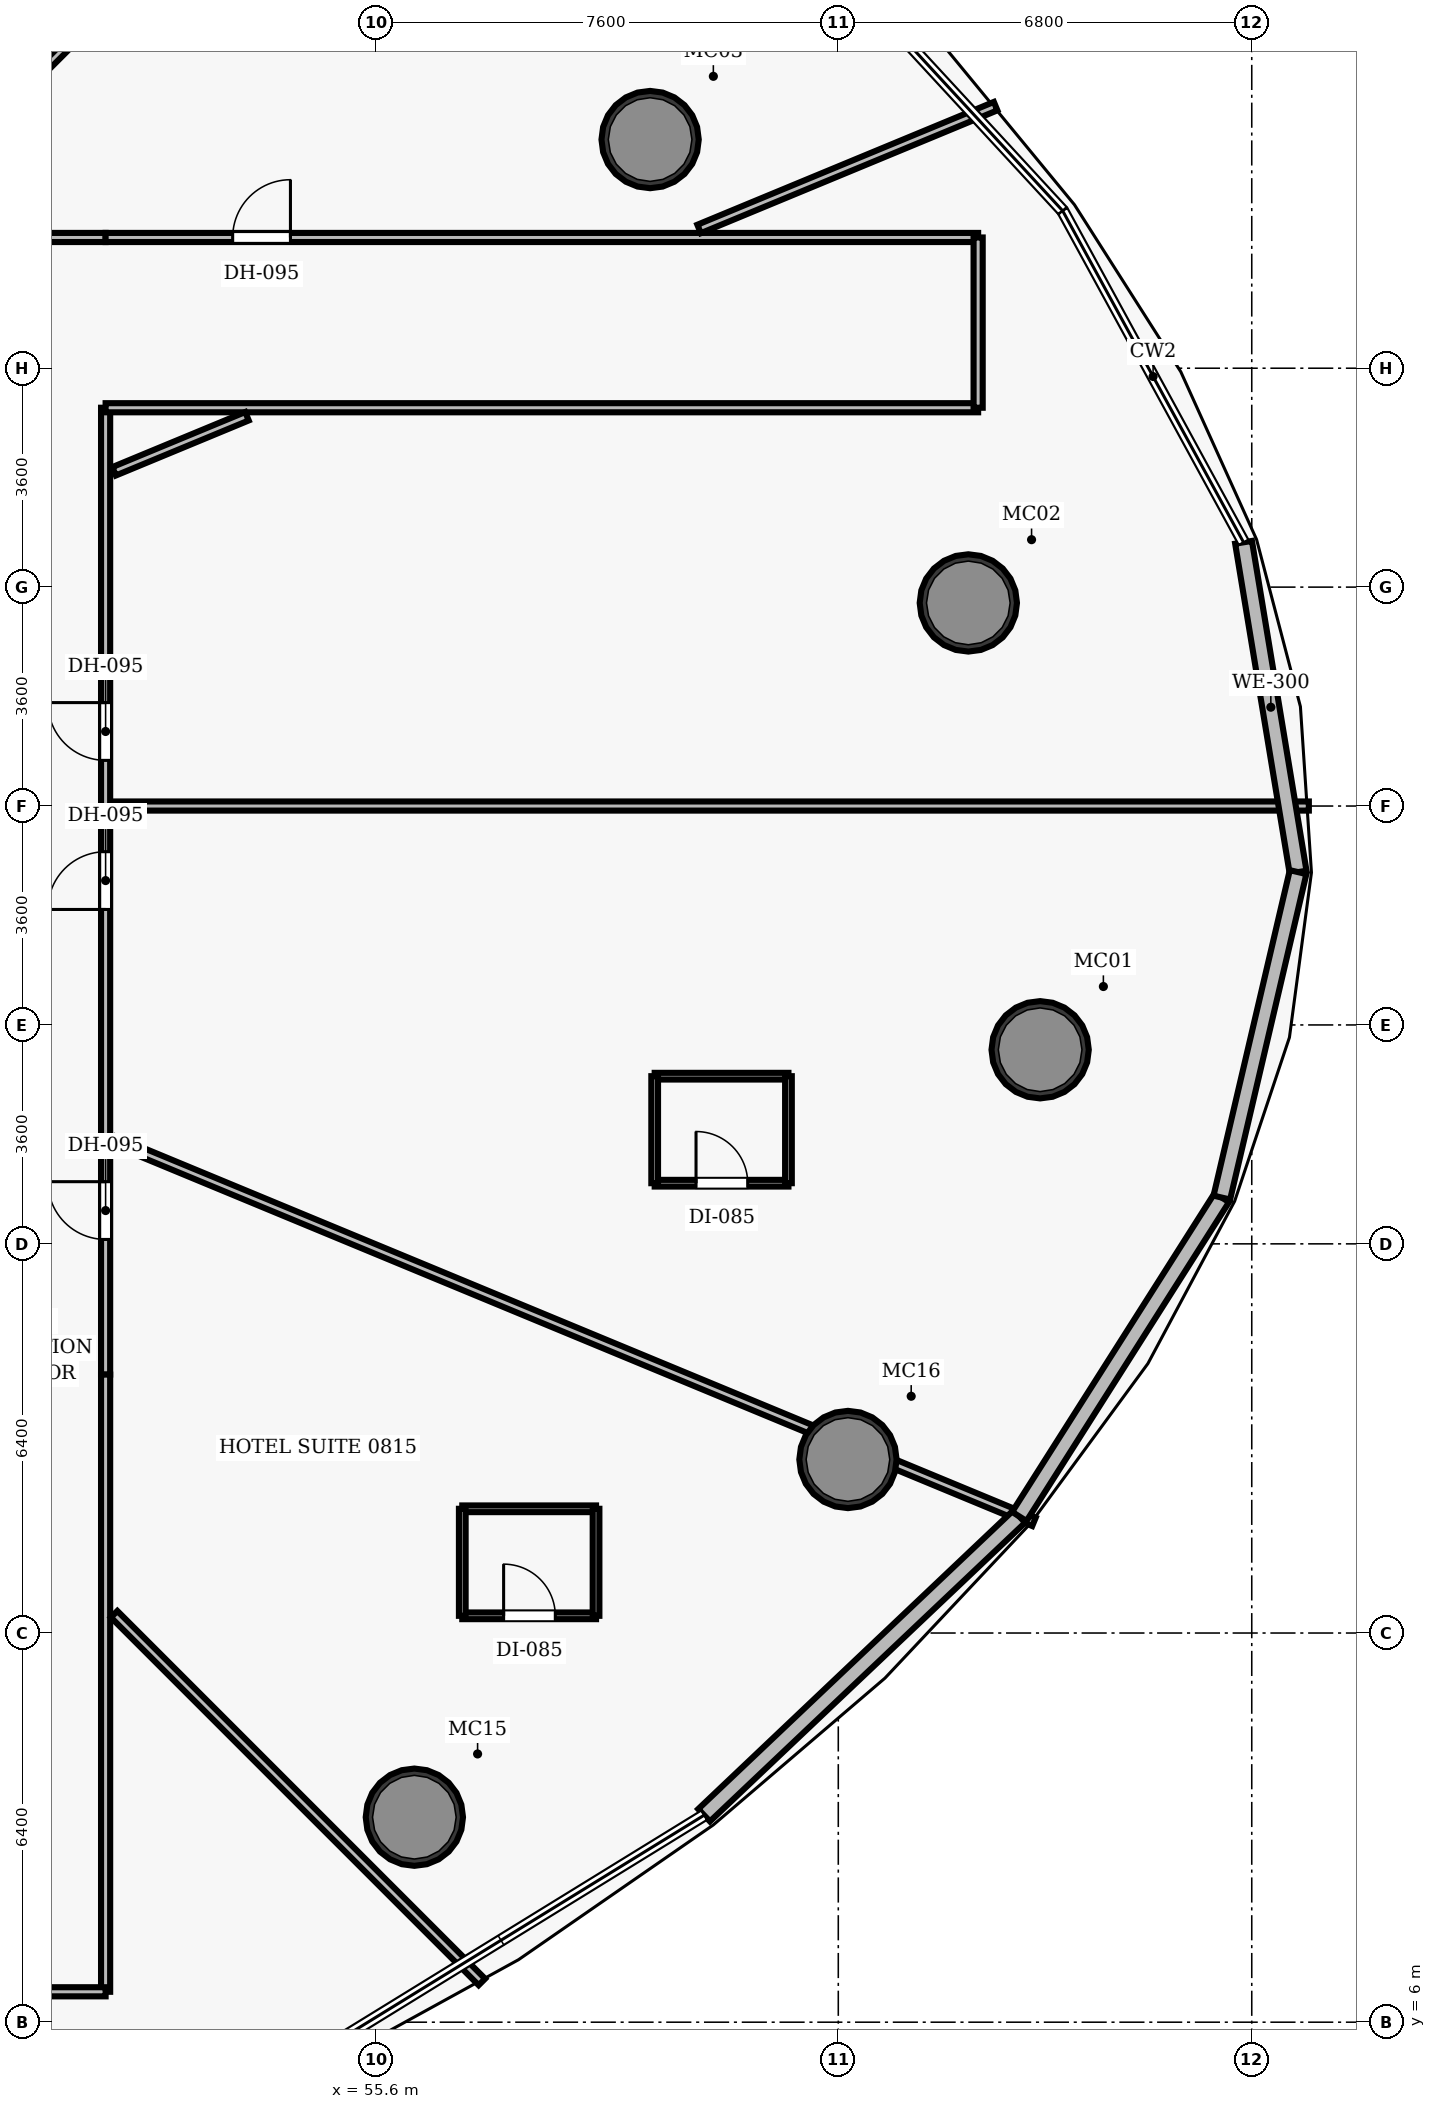
"""IFC4 building model, lengths in metres.
Left out: names, types, materials, properties, quantities, classifications, styles, units other than length and angle.
Written with IfcOpenShell. Run it as: python <this file> out.ifc"""

import sys

from ifc_helpers import new_model, si_unit, direction, frame, frame_2d, origin, origin_2d, place, context, subcontext, project, spatial, rectangle, hollow_circle, extrude, element, fill, save


model = new_model("IFC4")
c1 = context("Model", 3, precision=1e-05, world=origin(), true_north=direction((0.0, 1.0)))
c2 = subcontext(c1, "Body", "Model", "MODEL_VIEW")
j1 = project(units=[si_unit("LENGTHUNIT", "METRE"), si_unit("PLANEANGLEUNIT", "RADIAN")], contexts=[c1])
p1 = place(None, origin())
s1 = spatial("IfcSite", under=j1, at=p1, CompositionType="ELEMENT")
p2 = place(p1, origin())
s2 = spatial("IfcBuilding", under=s1, at=p2, CompositionType="ELEMENT")
p3 = place(p2, frame((0.0, 0.0, 44.9)))
s3 = spatial("IfcBuildingStorey", under=s2, at=p3, CompositionType="ELEMENT", Elevation=44.9)
for number, where, z_axis, x_axis in (
    (1, (66.52, 21.992, 0.0), (0.0, 0.0, 1.0), (1.0, 0.0, 0.0)),
    (2, (65.339, 29.34, 0.0), (0.0, 0.0, 1.0), (1.0, 0.0, 0.0)),
    (3, (60.105, 36.96, 0.0), (0.0, 0.0, 1.0), (1.0, 0.0, 0.0)),
    (4, (56.228, 9.371, 0.0), (0.0, 0.0, 1.0), (1.0, 0.0, 0.0)),
    (5, (63.359, 15.254, 0.0), (0.0, 0.0, 1.0), (1.0, 0.0, 0.0)),
):
    element("IfcColumn", number, at=place(p3, frame(where, z_axis=z_axis, x_axis=x_axis)), inside=s3, PredefinedType="COLUMN", context=c2, shape_type="SweptSolid", body=[
        extrude(hollow_circle(Radius=0.8, WallThickness=0.06, at=origin_2d()), origin(), (0.0, 0.0, 1.0), 3.5),
    ])
p4 = place(p3, frame((27.65, 35.35, 0.0), z_axis=(0.0, 0.0, 1.0), x_axis=(1.0, 0.0, 0.0)))
e6 = element("IfcWall", 6, at=p4, inside=s3, PredefinedType="PARTITIONING", context=c2, shape_type="SweptSolid", body=[
    extrude(rectangle(XDim=23.5, YDim=0.15, at=frame_2d((11.75, 0.0))), origin(), (0.0, 0.0, 1.0), 2.6),
])
p5 = place(p4, frame((15.045, 0.0, 0.0)))
e7 = element("IfcOpeningElement", 7, at=p5, cuts=e6, PredefinedType="OPENING", context=c2, shape_type="SweptSolid", body=[
    extrude(rectangle(XDim=0.95, YDim=2.15, at=frame_2d((0.475, 1.075))), frame((0.0, 0.085, 0.0), z_axis=(0.0, -1.0, 0.0), x_axis=(1.0, 0.0, 0.0)), (0.0, 0.0, 1.0), 0.17),
])
p6 = place(p4, frame((11.159, 0.0, 0.0)))
e8 = element("IfcOpeningElement", 8, at=p6, cuts=e6, PredefinedType="OPENING", context=c2, shape_type="SweptSolid", body=[
    extrude(rectangle(XDim=0.95, YDim=2.15, at=frame_2d((0.475, 1.075))), frame((0.0, 0.085, 0.0), z_axis=(0.0, -1.0, 0.0), x_axis=(1.0, 0.0, 0.0)), (0.0, 0.0, 1.0), 0.17),
])
p7 = place(p4, frame((7.914, 0.0, 0.0)))
e9 = element("IfcOpeningElement", 9, at=p7, cuts=e6, PredefinedType="OPENING", context=c2, shape_type="SweptSolid", body=[
    extrude(rectangle(XDim=0.95, YDim=2.15, at=frame_2d((0.475, 1.075))), frame((0.0, 0.085, 0.0), z_axis=(0.0, -1.0, 0.0), x_axis=(1.0, 0.0, 0.0)), (0.0, 0.0, 1.0), 0.17),
])
p8 = place(p4, frame((4.705, 0.0, 0.0)))
e10 = element("IfcOpeningElement", 10, at=p8, cuts=e6, PredefinedType="OPENING", context=c2, shape_type="SweptSolid", body=[
    extrude(rectangle(XDim=0.95, YDim=2.15, at=frame_2d((0.475, 1.075))), frame((0.0, 0.085, 0.0), z_axis=(0.0, -1.0, 0.0), x_axis=(1.0, 0.0, 0.0)), (0.0, 0.0, 1.0), 0.17),
])
p9 = place(p3, frame((51.15, 16.65, 0.0), z_axis=(0.0, 0.0, 1.0), x_axis=(0.0, 1.0, 0.0)))
e11 = element("IfcWall", 11, at=p9, inside=s3, PredefinedType="PARTITIONING", context=c2, shape_type="SweptSolid", body=[
    extrude(rectangle(XDim=15.9, YDim=0.15, at=frame_2d((7.95, 0.0))), origin(), (0.0, 0.0, 1.0), 2.6),
])
p10 = place(p9, frame((10.101, 0.0, 0.0)))
e12 = element("IfcOpeningElement", 12, at=p10, cuts=e11, PredefinedType="OPENING", context=c2, shape_type="SweptSolid", body=[
    extrude(rectangle(XDim=0.95, YDim=2.15, at=frame_2d((0.475, 1.075))), frame((0.0, 0.085, 0.0), z_axis=(0.0, -1.0, 0.0), x_axis=(1.0, 0.0, 0.0)), (0.0, 0.0, 1.0), 0.17),
])
p11 = place(p9, frame((2.222, 0.0, 0.0)))
e13 = element("IfcOpeningElement", 13, at=p11, cuts=e11, PredefinedType="OPENING", context=c2, shape_type="SweptSolid", body=[
    extrude(rectangle(XDim=0.95, YDim=2.15, at=frame_2d((0.475, 1.075))), frame((0.0, 0.085, 0.0), z_axis=(0.0, -1.0, 0.0), x_axis=(1.0, 0.0, 0.0)), (0.0, 0.0, 1.0), 0.17),
])
p12 = place(p9, frame((7.649, 0.0, 0.0)))
e14 = element("IfcOpeningElement", 14, at=p12, cuts=e11, PredefinedType="OPENING", context=c2, shape_type="SweptSolid", body=[
    extrude(rectangle(XDim=0.95, YDim=2.15, at=frame_2d((0.475, 1.075))), frame((0.0, 0.085, 0.0), z_axis=(0.0, -1.0, 0.0), x_axis=(1.0, 0.0, 0.0)), (0.0, 0.0, 1.0), 0.17),
])
p13 = place(p3, frame((51.15, 35.35, 0.0), z_axis=(0.0, 0.0, 1.0), x_axis=(1.0, 0.0, 0.0)))
e15 = element("IfcWall", 15, at=p13, inside=s3, PredefinedType="PARTITIONING", context=c2, shape_type="SweptSolid", body=[
    extrude(rectangle(XDim=14.35, YDim=0.15, at=frame_2d((7.175, 0.0))), origin(), (0.0, 0.0, 1.0), 2.6),
])
p14 = place(p13, frame((2.09, 0.0, 0.0)))
e16 = element("IfcOpeningElement", 16, at=p14, cuts=e15, PredefinedType="OPENING", context=c2, shape_type="SweptSolid", body=[
    extrude(rectangle(XDim=0.95, YDim=2.15, at=frame_2d((0.475, 1.075))), frame((0.0, 0.085, 0.0), z_axis=(0.0, -1.0, 0.0), x_axis=(1.0, 0.0, 0.0)), (0.0, 0.0, 1.0), 0.17),
])
p15 = place(p3, frame((51.15, 32.55, 0.0), z_axis=(0.0, 0.0, 1.0), x_axis=(1.0, 0.0, 0.0)))
e17 = element("IfcWall", 17, at=p15, inside=s3, PredefinedType="PARTITIONING", context=c2, shape_type="SweptSolid", body=[
    extrude(rectangle(XDim=14.35, YDim=0.15, at=frame_2d((7.175, 0.0))), origin(), (0.0, 0.0, 1.0), 2.6),
])
p16 = place(p3, frame((65.5, 32.55, 0.0), z_axis=(0.0, 0.0, 1.0), x_axis=(0.0, 1.0, 0.0)))
e18 = element("IfcWall", 18, at=p16, inside=s3, PredefinedType="PARTITIONING", context=c2, shape_type="SweptSolid", body=[
    extrude(rectangle(XDim=2.8, YDim=0.15, at=frame_2d((1.4, 0.0))), origin(), (0.0, 0.0, 1.0), 2.6),
])
p17 = place(p3, frame((51.15, 6.5, 0.0), z_axis=(0.0, 0.0, 1.0), x_axis=(0.0, 1.0, 0.0)))
e19 = element("IfcWall", 19, at=p17, inside=s3, PredefinedType="PARTITIONING", context=c2, shape_type="SweptSolid", body=[
    extrude(rectangle(XDim=10.15, YDim=0.15, at=frame_2d((5.075, 0.0))), origin(), (0.0, 0.0, 1.0), 2.6),
])
p18 = place(p3, frame((48.35, 6.5, 0.0), z_axis=(0.0, 0.0, 1.0), x_axis=(1.0, 0.0, 0.0)))
e20 = element("IfcWall", 20, at=p18, inside=s3, PredefinedType="PARTITIONING", context=c2, shape_type="SweptSolid", body=[
    extrude(rectangle(XDim=2.8, YDim=0.15, at=frame_2d((1.4, 0.0))), origin(), (0.0, 0.0, 1.0), 2.6),
])
p19 = place(p3, frame((51.29, 26.0, 0.0), z_axis=(0.0, 0.0, 1.0), x_axis=(1.0, 0.0, 0.0)))
e21 = element("IfcWall", 21, at=p19, inside=s3, PredefinedType="PARTITIONING", context=c2, shape_type="SweptSolid", body=[
    extrude(rectangle(XDim=19.649, YDim=0.15, at=frame_2d((9.824, 0.0))), origin(), (0.0, 0.0, 1.0), 2.6),
])
p20 = place(p3, frame((51.29, 31.505, 0.0), z_axis=(0.0, 0.0, 1.0), x_axis=(0.923887247067, 0.382664807249, 0.0)))
e22 = element("IfcWall", 22, at=p20, inside=s3, PredefinedType="PARTITIONING", context=c2, shape_type="SweptSolid", body=[
    extrude(rectangle(XDim=2.365, YDim=0.15, at=frame_2d((1.183, 0.0))), origin(), (0.0, 0.0, 1.0), 2.6),
])
p21 = place(p3, frame((60.911, 35.49, 0.0), z_axis=(0.0, 0.0, 1.0), x_axis=(0.923878157401, 0.382686752157, 0.0)))
e23 = element("IfcWall", 23, at=p21, inside=s3, PredefinedType="PARTITIONING", context=c2, shape_type="SweptSolid", body=[
    extrude(rectangle(XDim=5.279, YDim=0.15, at=frame_2d((2.639, 0.0))), origin(), (0.0, 0.0, 1.0), 2.6),
])
p22 = place(p3, frame((47.49, 35.49, 0.0), z_axis=(0.0, 0.0, 1.0), x_axis=(0.707106781187, 0.707106781187, 0.0)))
e24 = element("IfcWall", 24, at=p22, inside=s3, PredefinedType="PARTITIONING", context=c2, shape_type="SweptSolid", body=[
    extrude(rectangle(XDim=13.469, YDim=0.15, at=frame_2d((6.735, 0.0))), origin(), (0.0, 0.0, 1.0), 2.6),
])
p23 = place(p3, frame((51.29, 12.71, 0.0), z_axis=(0.0, 0.0, 1.0), x_axis=(0.707106781187, -0.707106781187, 0.0)))
e25 = element("IfcWall", 25, at=p23, inside=s3, PredefinedType="PARTITIONING", context=c2, shape_type="SweptSolid", body=[
    extrude(rectangle(XDim=8.554, YDim=0.15, at=frame_2d((4.277, 0.0))), origin(), (0.0, 0.0, 1.0), 2.6),
])
p24 = place(p3, frame((51.29, 20.495, 0.0), z_axis=(0.0, 0.0, 1.0), x_axis=(0.923878179833, -0.382686698003, 0.0)))
e26 = element("IfcWall", 26, at=p24, inside=s3, PredefinedType="PARTITIONING", context=c2, shape_type="SweptSolid", body=[
    extrude(rectangle(XDim=16.375, YDim=0.15, at=frame_2d((8.188, 0.0))), origin(), (0.0, 0.0, 1.0), 2.6),
])
p25 = place(p3, frame((57.016, 12.683, 0.0), z_axis=(0.0, 0.0, 1.0), x_axis=(1.0, 0.0, 0.0)))
e27 = element("IfcWall", 27, at=p25, inside=s3, PredefinedType="PARTITIONING", context=c2, shape_type="SweptSolid", body=[
    extrude(rectangle(XDim=2.2, YDim=0.11, at=frame_2d((1.1, 0.0))), origin(), (0.0, 0.0, 1.0), 2.6),
])
p26 = place(p25, frame((0.68, 0.0, 0.0)))
e28 = element("IfcOpeningElement", 28, at=p26, cuts=e27, PredefinedType="OPENING", context=c2, shape_type="SweptSolid", body=[
    extrude(rectangle(XDim=0.85, YDim=2.1, at=frame_2d((0.425, 1.05))), frame((0.0, 0.065, 0.0), z_axis=(0.0, -1.0, 0.0), x_axis=(1.0, 0.0, 0.0)), (0.0, 0.0, 1.0), 0.13),
])
p27 = place(p3, frame((57.016, 14.443, 0.0), z_axis=(0.0, 0.0, 1.0), x_axis=(1.0, 0.0, 0.0)))
e29 = element("IfcWall", 29, at=p27, inside=s3, PredefinedType="PARTITIONING", context=c2, shape_type="SweptSolid", body=[
    extrude(rectangle(XDim=2.2, YDim=0.11, at=frame_2d((1.1, 0.0))), origin(), (0.0, 0.0, 1.0), 2.6),
])
for number, where, z_axis, x_axis in (
    (30, (57.016, 12.683, 0.0), (0.0, 0.0, 1.0), (0.0, 1.0, 0.0)),
    (31, (59.216, 12.683, 0.0), (0.0, 0.0, 1.0), (0.0, 1.0, 0.0)),
):
    element("IfcWall", number, at=place(p3, frame(where, z_axis=z_axis, x_axis=x_axis)), inside=s3, PredefinedType="PARTITIONING", context=c2, shape_type="SweptSolid", body=[
        extrude(rectangle(XDim=1.76, YDim=0.11, at=frame_2d((0.88, 0.0))), origin(), (0.0, 0.0, 1.0), 2.6),
    ])
p28 = place(p3, frame((60.18, 19.797, 0.0), z_axis=(0.0, 0.0, 1.0), x_axis=(1.0, 0.0, 0.0)))
e32 = element("IfcWall", 32, at=p28, inside=s3, PredefinedType="PARTITIONING", context=c2, shape_type="SweptSolid", body=[
    extrude(rectangle(XDim=2.2, YDim=0.11, at=frame_2d((1.1, 0.0))), origin(), (0.0, 0.0, 1.0), 2.6),
])
p29 = place(p28, frame((0.68, 0.0, 0.0)))
e33 = element("IfcOpeningElement", 33, at=p29, cuts=e32, PredefinedType="OPENING", context=c2, shape_type="SweptSolid", body=[
    extrude(rectangle(XDim=0.85, YDim=2.1, at=frame_2d((0.425, 1.05))), frame((0.0, 0.065, 0.0), z_axis=(0.0, -1.0, 0.0), x_axis=(1.0, 0.0, 0.0)), (0.0, 0.0, 1.0), 0.13),
])
p30 = place(p3, frame((60.18, 21.557, 0.0), z_axis=(0.0, 0.0, 1.0), x_axis=(1.0, 0.0, 0.0)))
e34 = element("IfcWall", 34, at=p30, inside=s3, PredefinedType="PARTITIONING", context=c2, shape_type="SweptSolid", body=[
    extrude(rectangle(XDim=2.2, YDim=0.11, at=frame_2d((1.1, 0.0))), origin(), (0.0, 0.0, 1.0), 2.6),
])
for number, where, z_axis, x_axis in (
    (35, (60.18, 19.797, 0.0), (0.0, 0.0, 1.0), (0.0, 1.0, 0.0)),
    (36, (62.38, 19.797, 0.0), (0.0, 0.0, 1.0), (0.0, 1.0, 0.0)),
):
    element("IfcWall", number, at=place(p3, frame(where, z_axis=z_axis, x_axis=x_axis)), inside=s3, PredefinedType="PARTITIONING", context=c2, shape_type="SweptSolid", body=[
        extrude(rectangle(XDim=1.76, YDim=0.11, at=frame_2d((0.88, 0.0))), origin(), (0.0, 0.0, 1.0), 2.6),
    ])
p31 = place(p3, frame((69.865, 30.337, 0.0), z_axis=(0.0, 0.0, 1.0), x_axis=(0.163116967398, -0.986606737736, 0.0)))
e37 = element("IfcWall", 37, at=p31, inside=s3, PredefinedType="SOLIDWALL", context=c2, shape_type="SweptSolid", body=[
    extrude(rectangle(XDim=5.498, YDim=0.28, at=frame_2d((2.749, 0.0))), origin(), (0.0, 0.0, 1.0), 3.25),
])
p32 = place(p3, frame((66.177, 14.317, 0.0), z_axis=(0.0, 0.0, 1.0), x_axis=(-0.725822435786, -0.687882105967, 0.0)))
e38 = element("IfcWall", 38, at=p32, inside=s3, PredefinedType="SOLIDWALL", context=c2, shape_type="SweptSolid", body=[
    extrude(rectangle(XDim=7.143, YDim=0.28, at=frame_2d((3.571, 0.0))), origin(), (0.0, 0.0, 1.0), 3.25),
])
p33 = place(p3, frame((69.508, 19.561, 0.0), z_axis=(0.0, 0.0, 1.0), x_axis=(-0.536135283321, -0.844132073776, 0.0)))
e39 = element("IfcWall", 39, at=p33, inside=s3, PredefinedType="SOLIDWALL", context=c2, shape_type="SweptSolid", body=[
    extrude(rectangle(XDim=6.212, YDim=0.28, at=frame_2d((3.106, 0.0))), origin(), (0.0, 0.0, 1.0), 3.25),
])
p34 = place(p3, frame((70.762, 24.913, 0.0), z_axis=(0.0, 0.0, 1.0), x_axis=(-0.228140672465, -0.973628180348, 0.0)))
e40 = element("IfcWall", 40, at=p34, inside=s3, PredefinedType="SOLIDWALL", context=c2, shape_type="SweptSolid", body=[
    extrude(rectangle(XDim=5.497, YDim=0.28, at=frame_2d((2.749, 0.0))), origin(), (0.0, 0.0, 1.0), 3.25),
])
p35 = place(p10, origin())
e41 = element("IfcDoor", 41, at=p35, inside=s3, OperationType="SINGLE_SWING_RIGHT", PredefinedType="DOOR", context=c2, shape_type="SweptSolid", body=[
    extrude(rectangle(XDim=0.95, YDim=2.15, at=frame_2d((0.475, 1.075))), frame((0.0, 0.025, 0.0), z_axis=(0.0, -1.0, 0.0), x_axis=(1.0, 0.0, 0.0)), (0.0, 0.0, 1.0), 0.05),
])
fill(e12, e41)
p36 = place(p14, origin())
e42 = element("IfcDoor", 42, at=p36, inside=s3, OperationType="SINGLE_SWING_RIGHT", PredefinedType="DOOR", context=c2, shape_type="SweptSolid", body=[
    extrude(rectangle(XDim=0.95, YDim=2.15, at=frame_2d((0.475, 1.075))), frame((0.0, 0.025, 0.0), z_axis=(0.0, -1.0, 0.0), x_axis=(1.0, 0.0, 0.0)), (0.0, 0.0, 1.0), 0.05),
])
fill(e16, e42)
p37 = place(p11, origin())
e43 = element("IfcDoor", 43, at=p37, inside=s3, OperationType="SINGLE_SWING_RIGHT", PredefinedType="DOOR", context=c2, shape_type="SweptSolid", body=[
    extrude(rectangle(XDim=0.95, YDim=2.15, at=frame_2d((0.475, 1.075))), frame((0.0, 0.025, 0.0), z_axis=(0.0, -1.0, 0.0), x_axis=(1.0, 0.0, 0.0)), (0.0, 0.0, 1.0), 0.05),
])
fill(e13, e43)
p38 = place(p26, origin())
e44 = element("IfcDoor", 44, at=p38, inside=s3, OperationType="SINGLE_SWING_LEFT", PredefinedType="DOOR", context=c2, shape_type="SweptSolid", body=[
    extrude(rectangle(XDim=0.85, YDim=2.1, at=frame_2d((0.425, 1.05))), frame((0.0, 0.025, 0.0), z_axis=(0.0, -1.0, 0.0), x_axis=(1.0, 0.0, 0.0)), (0.0, 0.0, 1.0), 0.05),
])
fill(e28, e44)
p39 = place(p12, origin())
e45 = element("IfcDoor", 45, at=p39, inside=s3, OperationType="SINGLE_SWING_LEFT", PredefinedType="DOOR", context=c2, shape_type="SweptSolid", body=[
    extrude(rectangle(XDim=0.95, YDim=2.15, at=frame_2d((0.475, 1.075))), frame((0.0, 0.025, 0.0), z_axis=(0.0, -1.0, 0.0), x_axis=(1.0, 0.0, 0.0)), (0.0, 0.0, 1.0), 0.05),
])
fill(e14, e45)
p40 = place(p29, origin())
e46 = element("IfcDoor", 46, at=p40, inside=s3, OperationType="SINGLE_SWING_LEFT", PredefinedType="DOOR", context=c2, shape_type="SweptSolid", body=[
    extrude(rectangle(XDim=0.85, YDim=2.1, at=frame_2d((0.425, 1.05))), frame((0.0, 0.025, 0.0), z_axis=(0.0, -1.0, 0.0), x_axis=(1.0, 0.0, 0.0)), (0.0, 0.0, 1.0), 0.05),
])
fill(e33, e46)
save(model, sys.argv[1])
